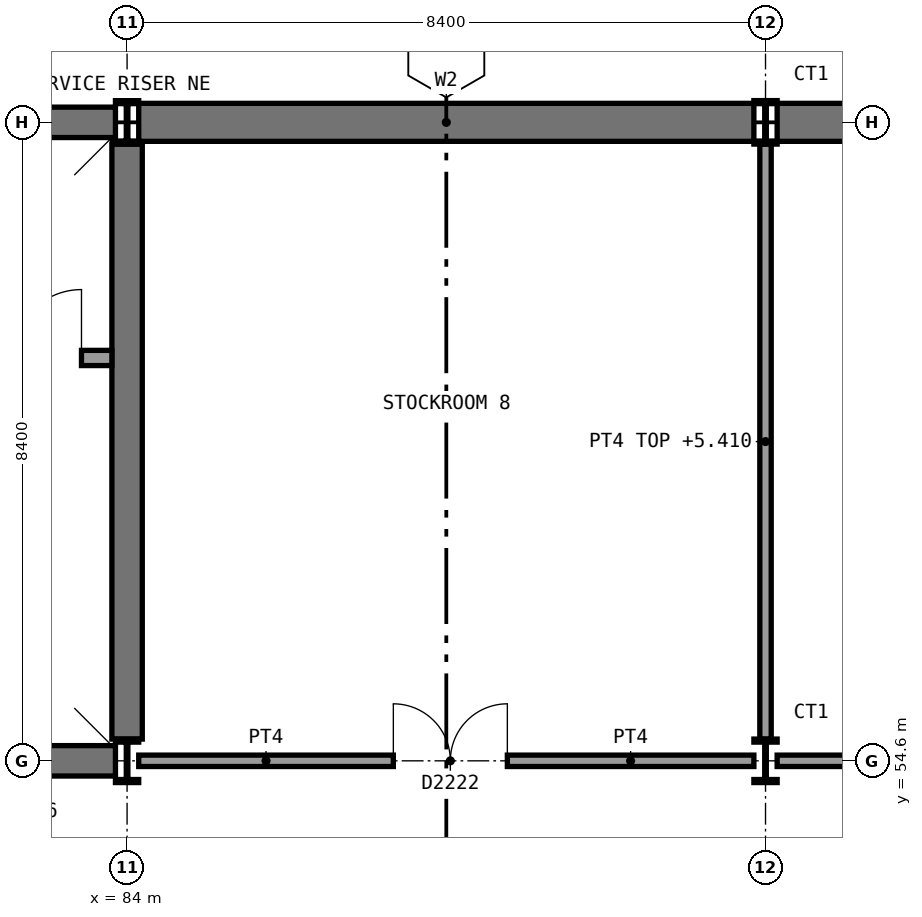
"""IFC4 building model, lengths in metres.
Left out: names, types, materials, properties, quantities, classifications, styles, units other than length and angle.
Written with IfcOpenShell. Run it as: python <this file> out.ifc"""

import sys

from ifc_helpers import new_model, si_unit, direction, frame, frame_2d, origin, origin_2d, place, context, subcontext, project, spatial, rectangle, i_section, extrude, element, fill, save


model = new_model("IFC4")
c1 = context("Model", 3, precision=1e-05, world=origin(), true_north=direction((0.0, 1.0)))
c2 = subcontext(c1, "Body", "Model", "MODEL_VIEW")
j1 = project(units=[si_unit("LENGTHUNIT", "METRE"), si_unit("PLANEANGLEUNIT", "RADIAN")], contexts=[c1])
p1 = place(None, origin())
s1 = spatial("IfcSite", under=j1, at=p1, CompositionType="ELEMENT")
p2 = place(p1, origin())
s2 = spatial("IfcBuilding", under=s1, at=p2, CompositionType="ELEMENT")
p3 = place(p2, origin())
s3 = spatial("IfcBuildingStorey", under=s2, at=p3, CompositionType="ELEMENT", Elevation=0.0)
p4 = place(p3, frame((84.153, 63.0, 0.0), z_axis=(0.0, 0.0, 1.0), x_axis=(1.0, 0.0, 0.0)))
e1 = element("IfcWall", 1, at=p4, inside=s3, PredefinedType="SHEAR", context=c2, shape_type="SweptSolid", body=[
    extrude(rectangle(XDim=8.094, YDim=0.5, at=frame_2d((4.047, 0.0))), origin(), (0.0, 0.0, 1.0), 5.85),
])
p5 = place(p3, frame((92.553, 63.0, 0.0), z_axis=(0.0, 0.0, 1.0), x_axis=(1.0, 0.0, 0.0)))
e2 = element("IfcWall", 2, at=p5, inside=s3, PredefinedType="SHEAR", context=c2, shape_type="SweptSolid", body=[
    extrude(rectangle(XDim=8.094, YDim=0.5, at=frame_2d((4.047, 0.0))), origin(), (0.0, 0.0, 1.0), 5.85),
])
p6 = place(p3, frame((75.75, 63.0, 0.0), z_axis=(0.0, 0.0, 1.0), x_axis=(1.0, 0.0, 0.0)))
e3 = element("IfcWall", 3, at=p6, inside=s3, PredefinedType="SHEAR", context=c2, shape_type="SweptSolid", body=[
    extrude(rectangle(XDim=8.097, YDim=0.4, at=frame_2d((4.048, 0.0))), origin(), (0.0, 0.0, 1.0), 5.85),
])
p7 = place(p3, frame((75.75, 54.6, 0.0), z_axis=(0.0, 0.0, 1.0), x_axis=(1.0, 0.0, 0.0)))
e4 = element("IfcWall", 4, at=p7, inside=s3, PredefinedType="SHEAR", context=c2, shape_type="SweptSolid", body=[
    extrude(rectangle(XDim=8.097, YDim=0.4, at=frame_2d((4.048, 0.0))), origin(), (0.0, 0.0, 1.0), 5.85),
])
p8 = place(p7, frame((5.3, 0.0, 0.0)))
e5 = element("IfcOpeningElement", 5, at=p8, cuts=e4, PredefinedType="OPENING", context=c2, shape_type="SweptSolid", body=[
    extrude(rectangle(XDim=1.8, YDim=2.1, at=frame_2d((0.9, 1.05))), frame((0.0, 0.21, 0.0), z_axis=(0.0, -1.0, 0.0), x_axis=(1.0, 0.0, 0.0)), (0.0, 0.0, 1.0), 0.42),
])
p9 = place(p7, frame((1.15, 0.0, 0.0)))
e6 = element("IfcOpeningElement", 6, at=p9, cuts=e4, PredefinedType="OPENING", context=c2, shape_type="SweptSolid", body=[
    extrude(rectangle(XDim=1.8, YDim=2.1, at=frame_2d((0.9, 1.05))), frame((0.0, 0.21, 0.0), z_axis=(0.0, -1.0, 0.0), x_axis=(1.0, 0.0, 0.0)), (0.0, 0.0, 1.0), 0.42),
])
p10 = place(p3, frame((84.0, 54.886, 0.0), z_axis=(0.0, 0.0, 1.0), x_axis=(0.0, 1.0, 0.0)))
e7 = element("IfcWall", 7, at=p10, inside=s3, PredefinedType="SHEAR", context=c2, shape_type="SweptSolid", body=[
    extrude(rectangle(XDim=7.828, YDim=0.4, at=frame_2d((3.914, 0.0))), origin(), (0.0, 0.0, 1.0), 5.85),
])
for number, where, z_axis, x_axis in (
    (8, (84.0, 54.6, 0.0), (0.0, 0.0, 1.0), (1.0, 0.0, 0.0)),
    (9, (84.0, 63.0, 0.0), (0.0, 0.0, 1.0), (1.0, 0.0, 0.0)),
    (10, (92.4, 54.6, 0.0), (0.0, 0.0, 1.0), (1.0, 0.0, 0.0)),
    (11, (92.4, 63.0, 0.0), (0.0, 0.0, 1.0), (1.0, 0.0, 0.0)),
):
    element("IfcColumn", number, at=place(p3, frame(where, z_axis=z_axis, x_axis=x_axis)), inside=s3, PredefinedType="COLUMN", context=c2, shape_type="SweptSolid", body=[
        extrude(i_section(OverallWidth=0.306, OverallDepth=0.572, WebThickness=0.021, FlangeThickness=0.04, FilletRadius=0.027, at=origin_2d()), origin(), (0.0, 0.0, 1.0), 6.0),
    ])
p11 = place(p3, frame((92.4, 54.886, 0.0), z_axis=(0.0, 0.0, 1.0), x_axis=(0.0, 1.0, 0.0)))
e12 = element("IfcWall", 12, at=p11, inside=s3, PredefinedType="SOLIDWALL", context=c2, shape_type="SweptSolid", body=[
    extrude(rectangle(XDim=7.828, YDim=0.15, at=frame_2d((3.914, 0.0))), origin(), (0.0, 0.0, 1.0), 5.41),
])
p12 = place(p3, frame((84.153, 54.6, 0.0), z_axis=(0.0, 0.0, 1.0), x_axis=(1.0, 0.0, 0.0)))
e13 = element("IfcWall", 13, at=p12, inside=s3, PredefinedType="SOLIDWALL", context=c2, shape_type="SweptSolid", body=[
    extrude(rectangle(XDim=8.094, YDim=0.15, at=frame_2d((4.047, 0.0))), origin(), (0.0, 0.0, 1.0), 5.52),
])
p13 = place(p12, frame((3.35, 0.0, 0.0)))
e14 = element("IfcOpeningElement", 14, at=p13, cuts=e13, PredefinedType="OPENING", context=c2, shape_type="SweptSolid", body=[
    extrude(rectangle(XDim=1.5, YDim=2.1, at=frame_2d((0.75, 1.05))), frame((0.0, 0.085, 0.0), z_axis=(0.0, -1.0, 0.0), x_axis=(1.0, 0.0, 0.0)), (0.0, 0.0, 1.0), 0.17),
])
p14 = place(p3, frame((92.553, 54.6, 0.0), z_axis=(0.0, 0.0, 1.0), x_axis=(1.0, 0.0, 0.0)))
e15 = element("IfcWall", 15, at=p14, inside=s3, PredefinedType="SOLIDWALL", context=c2, shape_type="SweptSolid", body=[
    extrude(rectangle(XDim=8.094, YDim=0.15, at=frame_2d((4.047, 0.0))), origin(), (0.0, 0.0, 1.0), 5.52),
])
p15 = place(p14, frame((3.35, 0.0, 0.0)))
e16 = element("IfcOpeningElement", 16, at=p15, cuts=e15, PredefinedType="OPENING", context=c2, shape_type="SweptSolid", body=[
    extrude(rectangle(XDim=1.5, YDim=2.1, at=frame_2d((0.75, 1.05))), frame((0.0, 0.085, 0.0), z_axis=(0.0, -1.0, 0.0), x_axis=(1.0, 0.0, 0.0)), (0.0, 0.0, 1.0), 0.17),
])
p16 = place(p3, frame((82.05, 59.9, 0.0), z_axis=(0.0, 0.0, 1.0), x_axis=(1.0, 0.0, 0.0)))
e17 = element("IfcWall", 17, at=p16, inside=s3, PredefinedType="PARTITIONING", context=c2, shape_type="SweptSolid", body=[
    extrude(rectangle(XDim=1.75, YDim=0.2, at=frame_2d((0.875, 0.0))), origin(), (0.0, 0.0, 1.0), 5.85),
])
p17 = place(p16, frame((0.45, 0.0, 0.0)))
e18 = element("IfcOpeningElement", 18, at=p17, cuts=e17, PredefinedType="OPENING", context=c2, shape_type="SweptSolid", body=[
    extrude(rectangle(XDim=0.9, YDim=2.1, at=frame_2d((0.45, 1.05))), frame((0.0, 0.11, 0.0), z_axis=(0.0, -1.0, 0.0), x_axis=(1.0, 0.0, 0.0)), (0.0, 0.0, 1.0), 0.22),
])
p18 = place(p13, origin())
e19 = element("IfcDoor", 19, at=p18, inside=s3, OperationType="DOUBLE_DOOR_SINGLE_SWING", PredefinedType="DOOR", context=c2, shape_type="SweptSolid", body=[
    extrude(rectangle(XDim=1.5, YDim=2.1, at=frame_2d((0.75, 1.05))), frame((0.0, 0.025, 0.0), z_axis=(0.0, -1.0, 0.0), x_axis=(1.0, 0.0, 0.0)), (0.0, 0.0, 1.0), 0.05),
])
fill(e14, e19)
p19 = place(p17, origin())
e20 = element("IfcDoor", 20, at=p19, inside=s3, OperationType="SINGLE_SWING_RIGHT", PredefinedType="DOOR", context=c2, shape_type="SweptSolid", body=[
    extrude(rectangle(XDim=0.9, YDim=2.1, at=frame_2d((0.45, 1.05))), frame((0.0, 0.025, 0.0), z_axis=(0.0, -1.0, 0.0), x_axis=(1.0, 0.0, 0.0)), (0.0, 0.0, 1.0), 0.05),
])
fill(e18, e20)
save(model, sys.argv[1])
